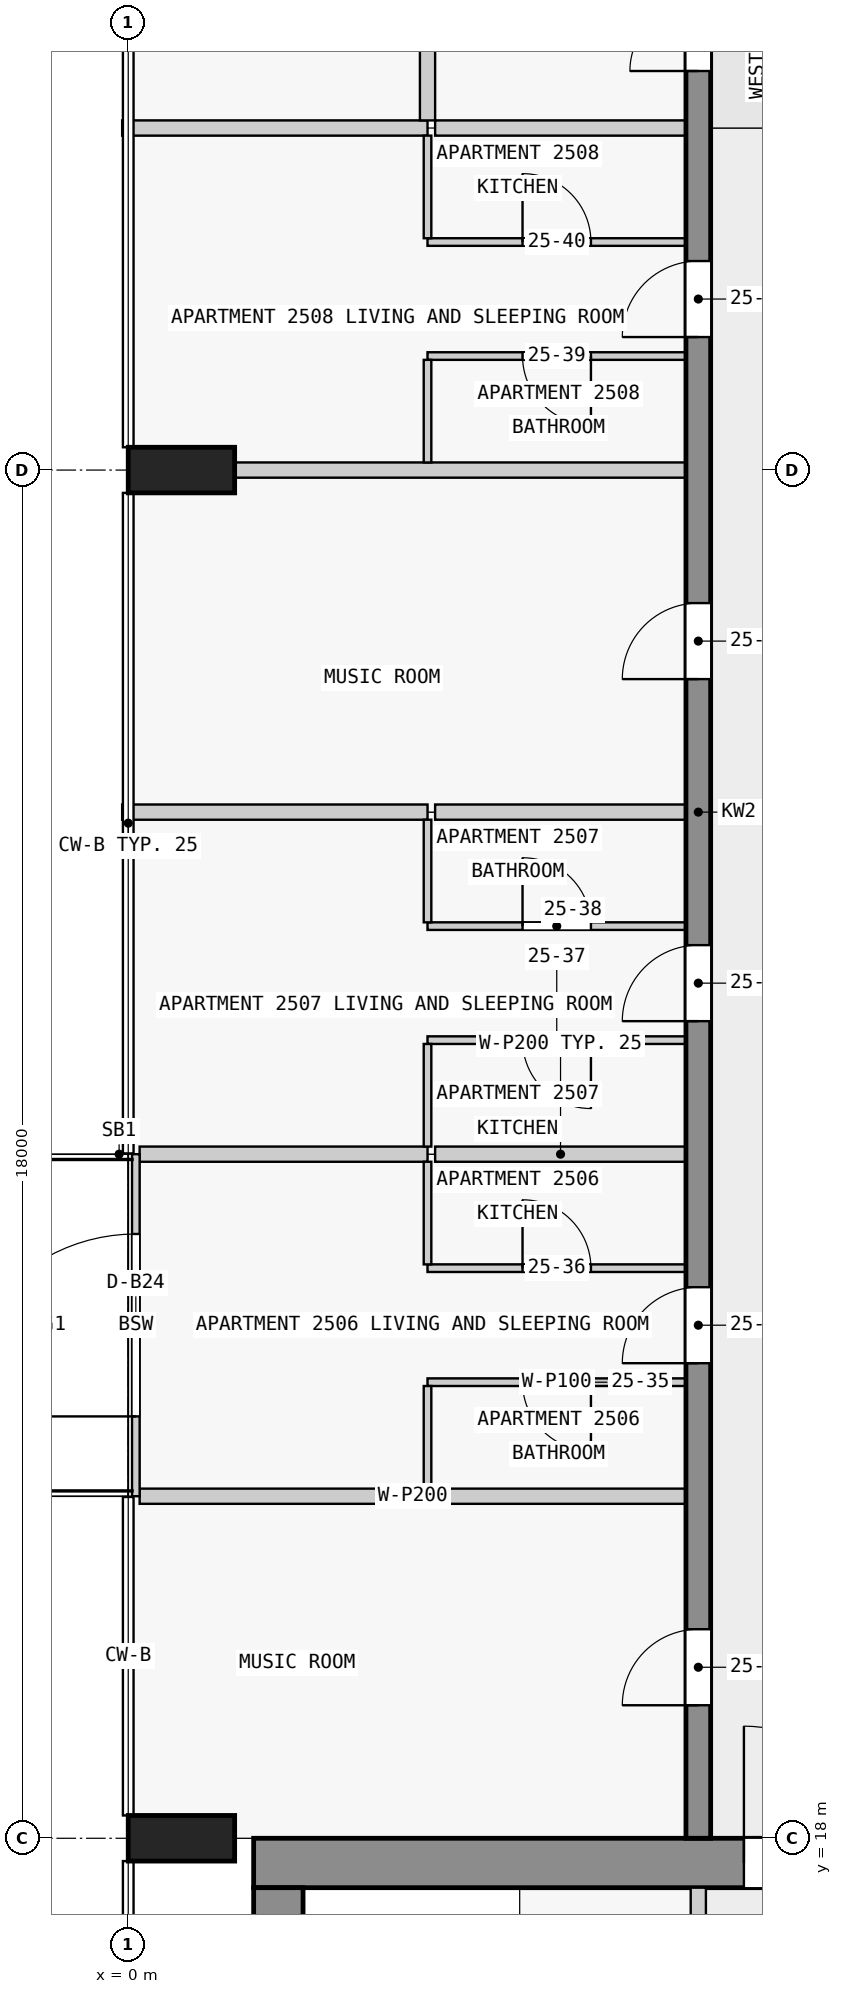
"""IFC4 building model, lengths in metres.
Left out: names, types, materials, properties, quantities, classifications, styles, units other than length and angle.
Written with IfcOpenShell. Run it as: python <this file> out.ifc"""

import sys

from ifc_helpers import new_model, si_unit, direction, frame, frame_2d, origin, origin_2d, place, context, subcontext, project, spatial, rectangle, extrude, element, fill, save


model = new_model("IFC4")
c1 = context("Model", 3, precision=1e-05, world=origin(), true_north=direction((0.0, 1.0)))
c2 = subcontext(c1, "Body", "Model", "MODEL_VIEW")
j1 = project(units=[si_unit("LENGTHUNIT", "METRE"), si_unit("PLANEANGLEUNIT", "RADIAN")], contexts=[c1])
p1 = place(None, origin())
s1 = spatial("IfcSite", under=j1, at=p1, CompositionType="ELEMENT")
p2 = place(p1, origin())
s2 = spatial("IfcBuilding", under=s1, at=p2, CompositionType="ELEMENT")
p3 = place(p2, frame((0.0, 0.0, 99.3)))
s3 = spatial("IfcBuildingStorey", under=s2, at=p3, CompositionType="ELEMENT", Elevation=99.3)
for number, where, z_axis, x_axis in (
    (1, (0.7, 36.0, 0.0), (0.0, 0.0, 1.0), (0.0, 1.0, 0.0)),
    (2, (0.7, 18.0, 0.0), (0.0, 0.0, 1.0), (0.0, 1.0, 0.0)),
):
    element("IfcColumn", number, at=place(p3, frame(where, z_axis=z_axis, x_axis=x_axis)), inside=s3, PredefinedType="COLUMN", context=c2, shape_type="SweptSolid", body=[
        extrude(rectangle(XDim=0.6, YDim=1.4, at=origin_2d()), origin(), (0.0, 0.0, 1.0), 3.5),
    ])
p4 = place(p3, frame((1.65, 17.675, 0.0), z_axis=(0.0, 0.0, 1.0), x_axis=(1.0, 0.0, 0.0)))
e3 = element("IfcWall", 3, at=p4, inside=s3, PredefinedType="SHEAR", context=c2, shape_type="SweptSolid", body=[
    extrude(rectangle(XDim=20.85, YDim=0.65, at=frame_2d((10.425, 0.0))), origin(), (0.0, 0.0, 1.0), 3.25),
])
p5 = place(p4, frame((6.45, 0.0, 0.0)))
e4 = element("IfcOpeningElement", 4, at=p5, cuts=e3, PredefinedType="OPENING", context=c2, shape_type="SweptSolid", body=[
    extrude(rectangle(XDim=1.8, YDim=2.1, at=frame_2d((0.9, 1.05))), frame((0.0, 0.335, 0.0), z_axis=(0.0, -1.0, 0.0), x_axis=(1.0, 0.0, 0.0)), (0.0, 0.0, 1.0), 0.67),
])
p6 = place(p3, frame((1.975, 2.5, 0.0), z_axis=(0.0, 0.0, 1.0), x_axis=(0.0, 1.0, 0.0)))
e5 = element("IfcWall", 5, at=p6, inside=s3, PredefinedType="SHEAR", context=c2, shape_type="SweptSolid", body=[
    extrude(rectangle(XDim=14.85, YDim=0.65, at=frame_2d((7.425, 0.0))), origin(), (0.0, 0.0, 1.0), 3.25),
])
p7 = place(p3, frame((7.5, 18.0, 0.0), z_axis=(0.0, 0.0, 1.0), x_axis=(0.0, 1.0, 0.0)))
e6 = element("IfcWall", 6, at=p7, inside=s3, PredefinedType="SHEAR", context=c2, shape_type="SweptSolid", body=[
    extrude(rectangle(XDim=27.0, YDim=0.325, at=frame_2d((13.5, 0.0))), origin(), (0.0, 0.0, 1.0), 3.25),
])
p8 = place(p7, frame((1.75, 0.0, 0.0)))
e7 = element("IfcOpeningElement", 7, at=p8, cuts=e6, PredefinedType="OPENING", context=c2, shape_type="SweptSolid", body=[
    extrude(rectangle(XDim=1.0, YDim=2.1, at=frame_2d((0.5, 1.05))), frame((0.0, 0.172, 0.0), z_axis=(0.0, -1.0, 0.0), x_axis=(1.0, 0.0, 0.0)), (0.0, 0.0, 1.0), 0.345),
])
p9 = place(p7, frame((6.25, 0.0, 0.0)))
e8 = element("IfcOpeningElement", 8, at=p9, cuts=e6, PredefinedType="OPENING", context=c2, shape_type="SweptSolid", body=[
    extrude(rectangle(XDim=1.0, YDim=2.1, at=frame_2d((0.5, 1.05))), frame((0.0, 0.172, 0.0), z_axis=(0.0, -1.0, 0.0), x_axis=(1.0, 0.0, 0.0)), (0.0, 0.0, 1.0), 0.345),
])
p10 = place(p7, frame((10.75, 0.0, 0.0)))
e9 = element("IfcOpeningElement", 9, at=p10, cuts=e6, PredefinedType="OPENING", context=c2, shape_type="SweptSolid", body=[
    extrude(rectangle(XDim=1.0, YDim=2.1, at=frame_2d((0.5, 1.05))), frame((0.0, 0.172, 0.0), z_axis=(0.0, -1.0, 0.0), x_axis=(1.0, 0.0, 0.0)), (0.0, 0.0, 1.0), 0.345),
])
p11 = place(p7, frame((15.25, 0.0, 0.0)))
e10 = element("IfcOpeningElement", 10, at=p11, cuts=e6, PredefinedType="OPENING", context=c2, shape_type="SweptSolid", body=[
    extrude(rectangle(XDim=1.0, YDim=2.1, at=frame_2d((0.5, 1.05))), frame((0.0, 0.172, 0.0), z_axis=(0.0, -1.0, 0.0), x_axis=(1.0, 0.0, 0.0)), (0.0, 0.0, 1.0), 0.345),
])
p12 = place(p7, frame((19.75, 0.0, 0.0)))
e11 = element("IfcOpeningElement", 11, at=p12, cuts=e6, PredefinedType="OPENING", context=c2, shape_type="SweptSolid", body=[
    extrude(rectangle(XDim=1.0, YDim=2.1, at=frame_2d((0.5, 1.05))), frame((0.0, 0.172, 0.0), z_axis=(0.0, -1.0, 0.0), x_axis=(1.0, 0.0, 0.0)), (0.0, 0.0, 1.0), 0.345),
])
p13 = place(p7, frame((23.25, 0.0, 0.0)))
e12 = element("IfcOpeningElement", 12, at=p13, cuts=e6, PredefinedType="OPENING", context=c2, shape_type="SweptSolid", body=[
    extrude(rectangle(XDim=0.9, YDim=2.1, at=frame_2d((0.45, 1.05))), frame((0.0, 0.172, 0.0), z_axis=(0.0, -1.0, 0.0), x_axis=(1.0, 0.0, 0.0)), (0.0, 0.0, 1.0), 0.345),
])
p14 = place(p7, frame((25.45, 0.0, 0.0)))
e13 = element("IfcOpeningElement", 13, at=p14, cuts=e6, PredefinedType="OPENING", context=c2, shape_type="SweptSolid", body=[
    extrude(rectangle(XDim=1.0, YDim=2.1, at=frame_2d((0.5, 1.05))), frame((0.0, 0.172, 0.0), z_axis=(0.0, -1.0, 0.0), x_axis=(1.0, 0.0, 0.0)), (0.0, 0.0, 1.0), 0.345),
])
p15 = place(p3, frame((0.1, 22.5, 0.0), z_axis=(0.0, 0.0, 1.0), x_axis=(0.0, 1.0, 0.0)))
e14 = element("IfcWall", 14, at=p15, inside=s3, PredefinedType="STANDARD", context=c2, shape_type="SweptSolid", body=[
    extrude(rectangle(XDim=4.5, YDim=0.1, at=frame_2d((2.25, 0.0))), origin(), (0.0, 0.0, 1.0), 3.25),
])
p16 = place(p15, frame((1.05, 0.0, 0.0)))
e15 = element("IfcOpeningElement", 15, at=p16, cuts=e14, PredefinedType="OPENING", context=c2, shape_type="SweptSolid", body=[
    extrude(rectangle(XDim=2.4, YDim=2.4, at=frame_2d((1.2, 1.2))), frame((0.0, 0.06, 0.0), z_axis=(0.0, -1.0, 0.0), x_axis=(1.0, 0.0, 0.0)), (0.0, 0.0, 1.0), 0.12),
])
p17 = place(p3, frame((7.5, 10.1, 0.0), z_axis=(0.0, 0.0, 1.0), x_axis=(0.0, 1.0, 0.0)))
e16 = element("IfcWall", 16, at=p17, inside=s3, PredefinedType="PARTITIONING", context=c2, shape_type="SweptSolid", body=[
    extrude(rectangle(XDim=7.25, YDim=0.2, at=frame_2d((3.625, 0.0))), origin(), (0.0, 0.0, 1.0), 3.25),
])
p18 = place(p17, frame((1.05, 0.0, 0.0)))
e17 = element("IfcOpeningElement", 17, at=p18, cuts=e16, PredefinedType="OPENING", context=c2, shape_type="SweptSolid", body=[
    extrude(rectangle(XDim=0.9, YDim=2.1, at=frame_2d((0.45, 1.05))), frame((0.0, 0.11, 0.0), z_axis=(0.0, -1.0, 0.0), x_axis=(1.0, 0.0, 0.0)), (0.0, 0.0, 1.0), 0.22),
])
p19 = place(p17, frame((4.675, 0.0, 0.0)))
e18 = element("IfcOpeningElement", 18, at=p19, cuts=e16, PredefinedType="OPENING", context=c2, shape_type="SweptSolid", body=[
    extrude(rectangle(XDim=0.9, YDim=2.1, at=frame_2d((0.45, 1.05))), frame((0.0, 0.11, 0.0), z_axis=(0.0, -1.0, 0.0), x_axis=(1.0, 0.0, 0.0)), (0.0, 0.0, 1.0), 0.22),
])
p20 = place(p3, frame((7.337, 22.5, 0.0), z_axis=(0.0, 0.0, 1.0), x_axis=(-1.0, 0.0, 0.0)))
e19 = element("IfcWall", 19, at=p20, inside=s3, PredefinedType="PARTITIONING", context=c2, shape_type="SweptSolid", body=[
    extrude(rectangle(XDim=7.188, YDim=0.2, at=frame_2d((3.594, 0.0))), origin(), (0.0, 0.0, 1.0), 3.25),
])
p21 = place(p3, frame((7.337, 24.0, 0.0), z_axis=(0.0, 0.0, 1.0), x_axis=(-1.0, 0.0, 0.0)))
e20 = element("IfcWall", 20, at=p21, inside=s3, PredefinedType="PARTITIONING", context=c2, shape_type="SweptSolid", body=[
    extrude(rectangle(XDim=3.4, YDim=0.1, at=frame_2d((1.7, 0.0))), origin(), (0.0, 0.0, 1.0), 3.25),
])
p22 = place(p21, frame((1.25, 0.0, 0.0)))
e21 = element("IfcOpeningElement", 21, at=p22, cuts=e20, PredefinedType="OPENING", context=c2, shape_type="SweptSolid", body=[
    extrude(rectangle(XDim=0.9, YDim=2.1, at=frame_2d((0.45, 1.05))), frame((0.0, 0.06, 0.0), z_axis=(0.0, -1.0, 0.0), x_axis=(1.0, 0.0, 0.0)), (0.0, 0.0, 1.0), 0.12),
])
p23 = place(p3, frame((3.938, 25.5, 0.0), z_axis=(0.0, 0.0, 1.0), x_axis=(1.0, 0.0, 0.0)))
e22 = element("IfcWall", 22, at=p23, inside=s3, PredefinedType="PARTITIONING", context=c2, shape_type="SweptSolid", body=[
    extrude(rectangle(XDim=3.4, YDim=0.1, at=frame_2d((1.7, 0.0))), origin(), (0.0, 0.0, 1.0), 3.25),
])
p24 = place(p23, frame((1.25, 0.0, 0.0)))
e23 = element("IfcOpeningElement", 23, at=p24, cuts=e22, PredefinedType="OPENING", context=c2, shape_type="SweptSolid", body=[
    extrude(rectangle(XDim=0.9, YDim=2.1, at=frame_2d((0.45, 1.05))), frame((0.0, 0.06, 0.0), z_axis=(0.0, -1.0, 0.0), x_axis=(1.0, 0.0, 0.0)), (0.0, 0.0, 1.0), 0.12),
])
p25 = place(p3, frame((7.337, 27.0, 0.0), z_axis=(0.0, 0.0, 1.0), x_axis=(-1.0, 0.0, 0.0)))
e24 = element("IfcWall", 24, at=p25, inside=s3, PredefinedType="PARTITIONING", context=c2, shape_type="SweptSolid", body=[
    extrude(rectangle(XDim=3.3, YDim=0.2, at=frame_2d((1.65, 0.0))), origin(), (0.0, 0.0, 1.0), 3.25),
])
p26 = place(p3, frame((0.15, 27.0, 0.0), z_axis=(0.0, 0.0, 1.0), x_axis=(1.0, 0.0, 0.0)))
e25 = element("IfcWall", 25, at=p26, inside=s3, PredefinedType="PARTITIONING", context=c2, shape_type="SweptSolid", body=[
    extrude(rectangle(XDim=3.788, YDim=0.2, at=frame_2d((1.894, 0.0))), origin(), (0.0, 0.0, 1.0), 3.25),
])
p27 = place(p3, frame((7.337, 28.5, 0.0), z_axis=(0.0, 0.0, 1.0), x_axis=(-1.0, 0.0, 0.0)))
e26 = element("IfcWall", 26, at=p27, inside=s3, PredefinedType="PARTITIONING", context=c2, shape_type="SweptSolid", body=[
    extrude(rectangle(XDim=3.4, YDim=0.1, at=frame_2d((1.7, 0.0))), origin(), (0.0, 0.0, 1.0), 3.25),
])
p28 = place(p27, frame((1.25, 0.0, 0.0)))
e27 = element("IfcOpeningElement", 27, at=p28, cuts=e26, PredefinedType="OPENING", context=c2, shape_type="SweptSolid", body=[
    extrude(rectangle(XDim=0.9, YDim=2.1, at=frame_2d((0.45, 1.05))), frame((0.0, 0.06, 0.0), z_axis=(0.0, -1.0, 0.0), x_axis=(1.0, 0.0, 0.0)), (0.0, 0.0, 1.0), 0.12),
])
p29 = place(p3, frame((3.938, 30.0, 0.0), z_axis=(0.0, 0.0, 1.0), x_axis=(1.0, 0.0, 0.0)))
e28 = element("IfcWall", 28, at=p29, inside=s3, PredefinedType="PARTITIONING", context=c2, shape_type="SweptSolid", body=[
    extrude(rectangle(XDim=3.4, YDim=0.1, at=frame_2d((1.7, 0.0))), origin(), (0.0, 0.0, 1.0), 3.25),
])
p30 = place(p29, frame((1.25, 0.0, 0.0)))
e29 = element("IfcOpeningElement", 29, at=p30, cuts=e28, PredefinedType="OPENING", context=c2, shape_type="SweptSolid", body=[
    extrude(rectangle(XDim=0.9, YDim=2.1, at=frame_2d((0.45, 1.05))), frame((0.0, 0.06, 0.0), z_axis=(0.0, -1.0, 0.0), x_axis=(1.0, 0.0, 0.0)), (0.0, 0.0, 1.0), 0.12),
])
p31 = place(p3, frame((7.337, 31.5, 0.0), z_axis=(0.0, 0.0, 1.0), x_axis=(-1.0, 0.0, 0.0)))
e30 = element("IfcWall", 30, at=p31, inside=s3, PredefinedType="PARTITIONING", context=c2, shape_type="SweptSolid", body=[
    extrude(rectangle(XDim=3.3, YDim=0.2, at=frame_2d((1.65, 0.0))), origin(), (0.0, 0.0, 1.0), 3.25),
])
p32 = place(p3, frame((-0.08, 31.5, 0.0), z_axis=(0.0, 0.0, 1.0), x_axis=(1.0, 0.0, 0.0)))
e31 = element("IfcWall", 31, at=p32, inside=s3, PredefinedType="PARTITIONING", context=c2, shape_type="SweptSolid", body=[
    extrude(rectangle(XDim=4.018, YDim=0.2, at=frame_2d((2.009, 0.0))), origin(), (0.0, 0.0, 1.0), 3.25),
])
p33 = place(p3, frame((7.337, 36.0, 0.0), z_axis=(0.0, 0.0, 1.0), x_axis=(-1.0, 0.0, 0.0)))
e32 = element("IfcWall", 32, at=p33, inside=s3, PredefinedType="PARTITIONING", context=c2, shape_type="SweptSolid", body=[
    extrude(rectangle(XDim=5.938, YDim=0.2, at=frame_2d((2.969, 0.0))), origin(), (0.0, 0.0, 1.0), 3.25),
])
p34 = place(p3, frame((7.337, 37.5, 0.0), z_axis=(0.0, 0.0, 1.0), x_axis=(-1.0, 0.0, 0.0)))
e33 = element("IfcWall", 33, at=p34, inside=s3, PredefinedType="PARTITIONING", context=c2, shape_type="SweptSolid", body=[
    extrude(rectangle(XDim=3.4, YDim=0.1, at=frame_2d((1.7, 0.0))), origin(), (0.0, 0.0, 1.0), 3.25),
])
p35 = place(p34, frame((1.25, 0.0, 0.0)))
e34 = element("IfcOpeningElement", 34, at=p35, cuts=e33, PredefinedType="OPENING", context=c2, shape_type="SweptSolid", body=[
    extrude(rectangle(XDim=0.9, YDim=2.1, at=frame_2d((0.45, 1.05))), frame((0.0, 0.06, 0.0), z_axis=(0.0, -1.0, 0.0), x_axis=(1.0, 0.0, 0.0)), (0.0, 0.0, 1.0), 0.12),
])
p36 = place(p3, frame((3.938, 39.0, 0.0), z_axis=(0.0, 0.0, 1.0), x_axis=(1.0, 0.0, 0.0)))
e35 = element("IfcWall", 35, at=p36, inside=s3, PredefinedType="PARTITIONING", context=c2, shape_type="SweptSolid", body=[
    extrude(rectangle(XDim=3.4, YDim=0.1, at=frame_2d((1.7, 0.0))), origin(), (0.0, 0.0, 1.0), 3.25),
])
p37 = place(p36, frame((1.25, 0.0, 0.0)))
e36 = element("IfcOpeningElement", 36, at=p37, cuts=e35, PredefinedType="OPENING", context=c2, shape_type="SweptSolid", body=[
    extrude(rectangle(XDim=0.9, YDim=2.1, at=frame_2d((0.45, 1.05))), frame((0.0, 0.06, 0.0), z_axis=(0.0, -1.0, 0.0), x_axis=(1.0, 0.0, 0.0)), (0.0, 0.0, 1.0), 0.12),
])
p38 = place(p3, frame((7.337, 40.5, 0.0), z_axis=(0.0, 0.0, 1.0), x_axis=(-1.0, 0.0, 0.0)))
e37 = element("IfcWall", 37, at=p38, inside=s3, PredefinedType="PARTITIONING", context=c2, shape_type="SweptSolid", body=[
    extrude(rectangle(XDim=3.3, YDim=0.2, at=frame_2d((1.65, 0.0))), origin(), (0.0, 0.0, 1.0), 3.25),
])
p39 = place(p3, frame((-0.08, 40.5, 0.0), z_axis=(0.0, 0.0, 1.0), x_axis=(1.0, 0.0, 0.0)))
e38 = element("IfcWall", 38, at=p39, inside=s3, PredefinedType="PARTITIONING", context=c2, shape_type="SweptSolid", body=[
    extrude(rectangle(XDim=4.018, YDim=0.2, at=frame_2d((2.009, 0.0))), origin(), (0.0, 0.0, 1.0), 3.25),
])
for number, where, z_axis, x_axis in (
    (39, (3.938, 23.95, 0.0), (0.0, 0.0, 1.0), (0.0, -1.0, 0.0)),
    (40, (3.938, 26.9, 0.0), (0.0, 0.0, 1.0), (0.0, -1.0, 0.0)),
    (41, (3.938, 28.45, 0.0), (0.0, 0.0, 1.0), (0.0, -1.0, 0.0)),
    (42, (3.938, 31.4, 0.0), (0.0, 0.0, 1.0), (0.0, -1.0, 0.0)),
    (43, (3.938, 37.45, 0.0), (0.0, 0.0, 1.0), (0.0, -1.0, 0.0)),
    (44, (3.938, 40.4, 0.0), (0.0, 0.0, 1.0), (0.0, -1.0, 0.0)),
):
    element("IfcWall", number, at=place(p3, frame(where, z_axis=z_axis, x_axis=x_axis)), inside=s3, PredefinedType="PARTITIONING", context=c2, shape_type="SweptSolid", body=[
        extrude(rectangle(XDim=1.35, YDim=0.1, at=frame_2d((0.675, 0.0))), origin(), (0.0, 0.0, 1.0), 3.25),
    ])
p40 = place(p3, frame((3.938, 42.8, 0.0), z_axis=(0.0, 0.0, 1.0), x_axis=(0.0, -1.0, 0.0)))
e45 = element("IfcWall", 45, at=p40, inside=s3, PredefinedType="PARTITIONING", context=c2, shape_type="SweptSolid", body=[
    extrude(rectangle(XDim=2.2, YDim=0.2, at=frame_2d((1.1, 0.0))), origin(), (0.0, 0.0, 1.0), 3.25),
])
p41 = place(p16, origin())
e46 = element("IfcDoor", 46, at=p41, inside=s3, OperationType="SINGLE_SWING_LEFT", PredefinedType="DOOR", context=c2, shape_type="SweptSolid", body=[
    extrude(rectangle(XDim=2.4, YDim=2.4, at=frame_2d((1.2, 1.2))), frame((0.0, 0.025, 0.0), z_axis=(0.0, -1.0, 0.0), x_axis=(1.0, 0.0, 0.0)), (0.0, 0.0, 1.0), 0.05),
])
fill(e15, e46)
p42 = place(p5, origin())
e47 = element("IfcDoor", 47, at=p42, inside=s3, OperationType="DOUBLE_DOOR_SINGLE_SWING", PredefinedType="DOOR", context=c2, shape_type="SweptSolid", body=[
    extrude(rectangle(XDim=1.8, YDim=2.1, at=frame_2d((0.9, 1.05))), frame((0.0, 0.025, 0.0), z_axis=(0.0, -1.0, 0.0), x_axis=(1.0, 0.0, 0.0)), (0.0, 0.0, 1.0), 0.05),
])
fill(e4, e47)
p43 = place(p8, origin())
e48 = element("IfcDoor", 48, at=p43, inside=s3, OperationType="SINGLE_SWING_LEFT", PredefinedType="DOOR", context=c2, shape_type="SweptSolid", body=[
    extrude(rectangle(XDim=1.0, YDim=2.1, at=frame_2d((0.5, 1.05))), frame((0.0, 0.025, 0.0), z_axis=(0.0, -1.0, 0.0), x_axis=(1.0, 0.0, 0.0)), (0.0, 0.0, 1.0), 0.05),
])
fill(e7, e48)
p44 = place(p9, origin())
e49 = element("IfcDoor", 49, at=p44, inside=s3, OperationType="SINGLE_SWING_LEFT", PredefinedType="DOOR", context=c2, shape_type="SweptSolid", body=[
    extrude(rectangle(XDim=1.0, YDim=2.1, at=frame_2d((0.5, 1.05))), frame((0.0, 0.025, 0.0), z_axis=(0.0, -1.0, 0.0), x_axis=(1.0, 0.0, 0.0)), (0.0, 0.0, 1.0), 0.05),
])
fill(e8, e49)
p45 = place(p10, origin())
e50 = element("IfcDoor", 50, at=p45, inside=s3, OperationType="SINGLE_SWING_LEFT", PredefinedType="DOOR", context=c2, shape_type="SweptSolid", body=[
    extrude(rectangle(XDim=1.0, YDim=2.1, at=frame_2d((0.5, 1.05))), frame((0.0, 0.025, 0.0), z_axis=(0.0, -1.0, 0.0), x_axis=(1.0, 0.0, 0.0)), (0.0, 0.0, 1.0), 0.05),
])
fill(e9, e50)
p46 = place(p11, origin())
e51 = element("IfcDoor", 51, at=p46, inside=s3, OperationType="SINGLE_SWING_RIGHT", PredefinedType="DOOR", context=c2, shape_type="SweptSolid", body=[
    extrude(rectangle(XDim=1.0, YDim=2.1, at=frame_2d((0.5, 1.05))), frame((0.0, 0.025, 0.0), z_axis=(0.0, -1.0, 0.0), x_axis=(1.0, 0.0, 0.0)), (0.0, 0.0, 1.0), 0.05),
])
fill(e10, e51)
p47 = place(p12, origin())
e52 = element("IfcDoor", 52, at=p47, inside=s3, OperationType="SINGLE_SWING_RIGHT", PredefinedType="DOOR", context=c2, shape_type="SweptSolid", body=[
    extrude(rectangle(XDim=1.0, YDim=2.1, at=frame_2d((0.5, 1.05))), frame((0.0, 0.025, 0.0), z_axis=(0.0, -1.0, 0.0), x_axis=(1.0, 0.0, 0.0)), (0.0, 0.0, 1.0), 0.05),
])
fill(e11, e52)
p48 = place(p13, origin())
e53 = element("IfcDoor", 53, at=p48, inside=s3, OperationType="SINGLE_SWING_RIGHT", PredefinedType="DOOR", context=c2, shape_type="SweptSolid", body=[
    extrude(rectangle(XDim=0.9, YDim=2.1, at=frame_2d((0.45, 1.05))), frame((0.0, 0.025, 0.0), z_axis=(0.0, -1.0, 0.0), x_axis=(1.0, 0.0, 0.0)), (0.0, 0.0, 1.0), 0.05),
])
fill(e12, e53)
p49 = place(p22, origin())
e54 = element("IfcDoor", 54, at=p49, inside=s3, OperationType="SINGLE_SWING_LEFT", PredefinedType="DOOR", context=c2, shape_type="SweptSolid", body=[
    extrude(rectangle(XDim=0.9, YDim=2.1, at=frame_2d((0.45, 1.05))), frame((0.0, 0.025, 0.0), z_axis=(0.0, -1.0, 0.0), x_axis=(1.0, 0.0, 0.0)), (0.0, 0.0, 1.0), 0.05),
])
fill(e21, e54)
p50 = place(p24, origin())
e55 = element("IfcDoor", 55, at=p50, inside=s3, OperationType="SINGLE_SWING_LEFT", PredefinedType="DOOR", context=c2, shape_type="SweptSolid", body=[
    extrude(rectangle(XDim=0.9, YDim=2.1, at=frame_2d((0.45, 1.05))), frame((0.0, 0.025, 0.0), z_axis=(0.0, -1.0, 0.0), x_axis=(1.0, 0.0, 0.0)), (0.0, 0.0, 1.0), 0.05),
])
fill(e23, e55)
p51 = place(p28, origin())
e56 = element("IfcDoor", 56, at=p51, inside=s3, OperationType="SINGLE_SWING_LEFT", PredefinedType="DOOR", context=c2, shape_type="SweptSolid", body=[
    extrude(rectangle(XDim=0.9, YDim=2.1, at=frame_2d((0.45, 1.05))), frame((0.0, 0.025, 0.0), z_axis=(0.0, -1.0, 0.0), x_axis=(1.0, 0.0, 0.0)), (0.0, 0.0, 1.0), 0.05),
])
fill(e27, e56)
p52 = place(p30, origin())
e57 = element("IfcDoor", 57, at=p52, inside=s3, OperationType="SINGLE_SWING_LEFT", PredefinedType="DOOR", context=c2, shape_type="SweptSolid", body=[
    extrude(rectangle(XDim=0.9, YDim=2.1, at=frame_2d((0.45, 1.05))), frame((0.0, 0.025, 0.0), z_axis=(0.0, -1.0, 0.0), x_axis=(1.0, 0.0, 0.0)), (0.0, 0.0, 1.0), 0.05),
])
fill(e29, e57)
p53 = place(p35, origin())
e58 = element("IfcDoor", 58, at=p53, inside=s3, OperationType="SINGLE_SWING_LEFT", PredefinedType="DOOR", context=c2, shape_type="SweptSolid", body=[
    extrude(rectangle(XDim=0.9, YDim=2.1, at=frame_2d((0.45, 1.05))), frame((0.0, 0.025, 0.0), z_axis=(0.0, -1.0, 0.0), x_axis=(1.0, 0.0, 0.0)), (0.0, 0.0, 1.0), 0.05),
])
fill(e34, e58)
p54 = place(p37, origin())
e59 = element("IfcDoor", 59, at=p54, inside=s3, OperationType="SINGLE_SWING_LEFT", PredefinedType="DOOR", context=c2, shape_type="SweptSolid", body=[
    extrude(rectangle(XDim=0.9, YDim=2.1, at=frame_2d((0.45, 1.05))), frame((0.0, 0.025, 0.0), z_axis=(0.0, -1.0, 0.0), x_axis=(1.0, 0.0, 0.0)), (0.0, 0.0, 1.0), 0.05),
])
fill(e36, e59)
save(model, sys.argv[1])
